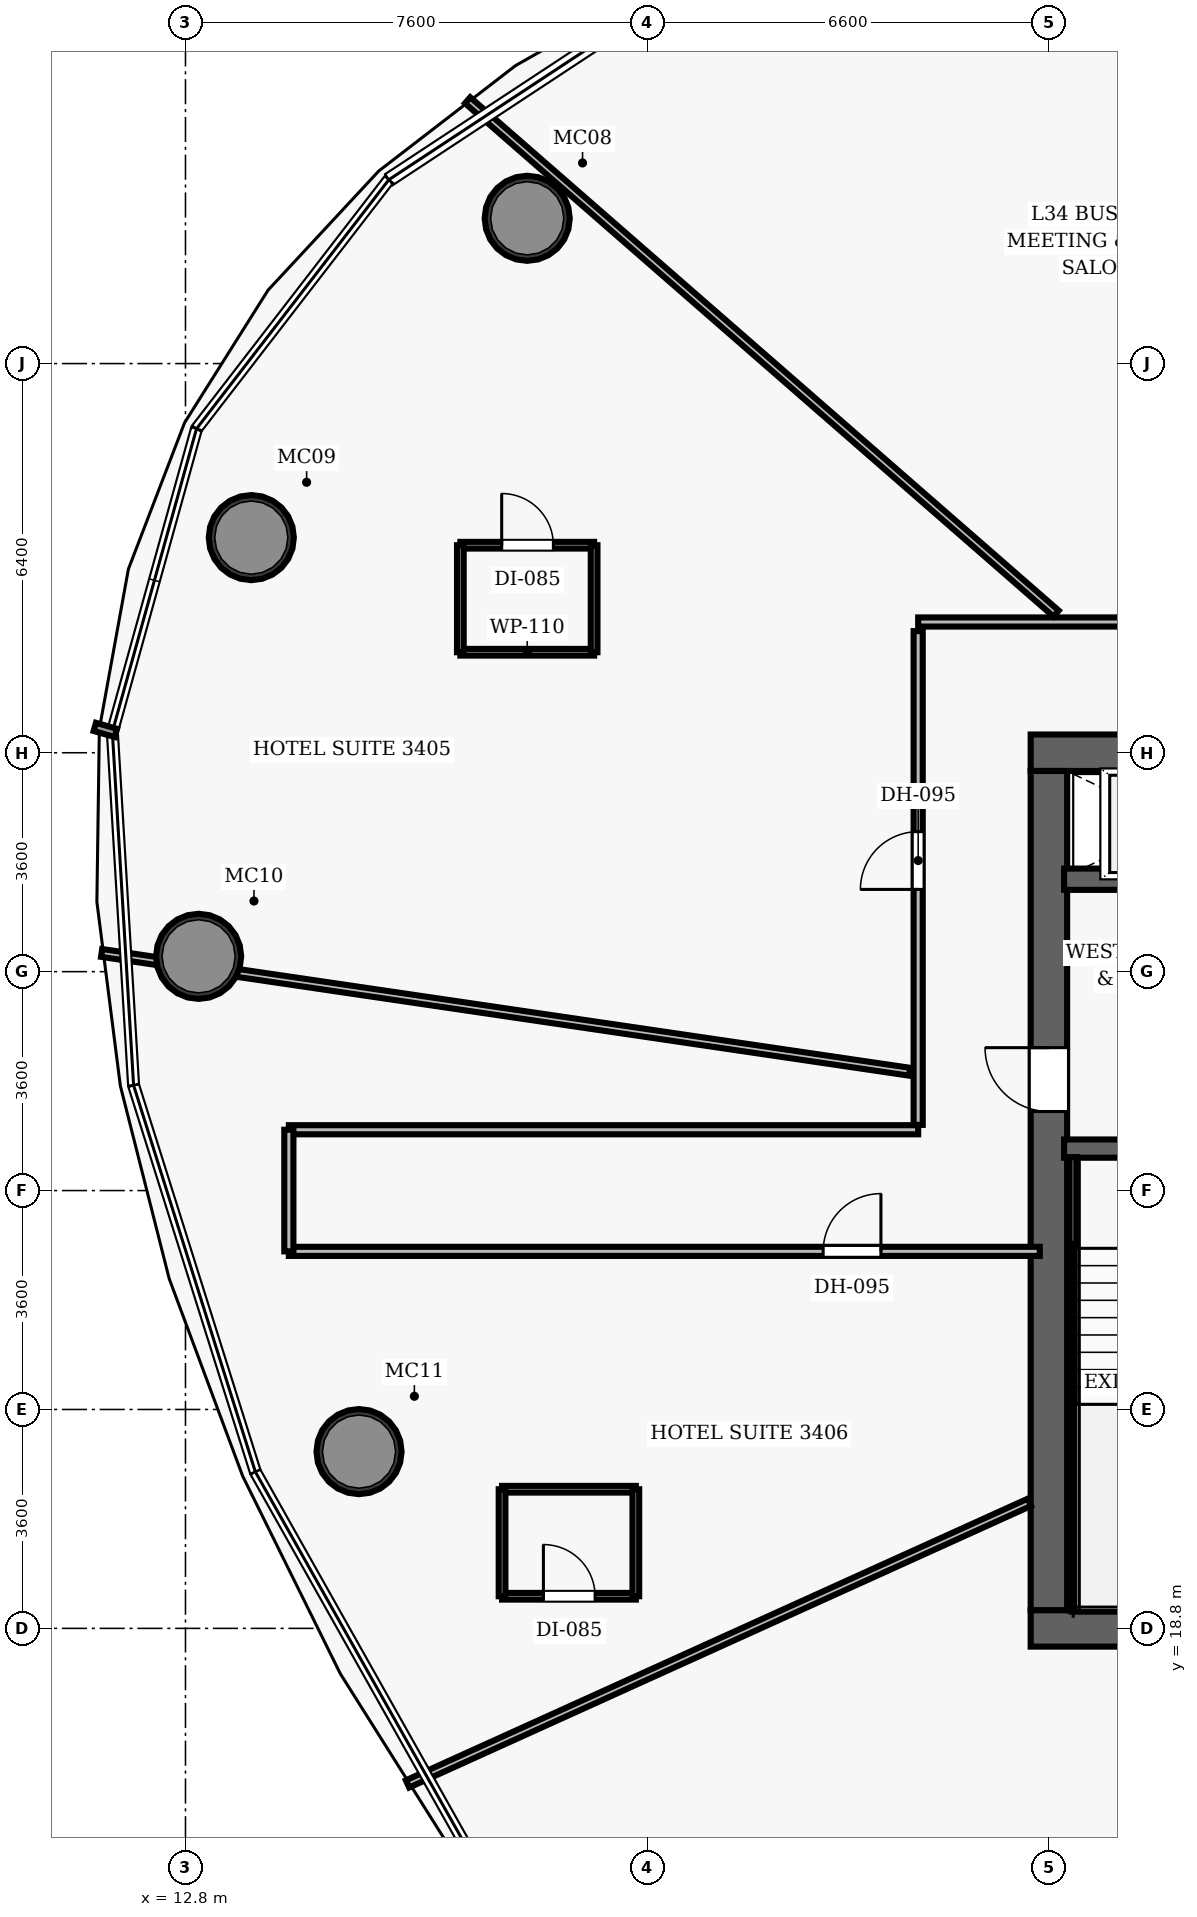
"""IFC4 building model, lengths in metres.
Left out: names, types, materials, properties, quantities, classifications, styles, units other than length and angle.
Written with IfcOpenShell. Run it as: python <this file> out.ifc"""

import sys

from ifc_helpers import new_model, si_unit, direction, frame, frame_2d, origin, origin_2d, place, context, subcontext, project, spatial, rectangle, hollow_circle, extrude, element, fill, save


model = new_model("IFC4")
c1 = context("Model", 3, precision=1e-05, world=origin(), true_north=direction((0.0, 1.0)))
c2 = subcontext(c1, "Body", "Model", "MODEL_VIEW")
j1 = project(units=[si_unit("LENGTHUNIT", "METRE"), si_unit("PLANEANGLEUNIT", "RADIAN")], contexts=[c1])
p1 = place(None, origin())
s1 = spatial("IfcSite", under=j1, at=p1, CompositionType="ELEMENT")
p2 = place(p1, origin())
s2 = spatial("IfcBuilding", under=s1, at=p2, CompositionType="ELEMENT")
p3 = place(p2, frame((0.0, 0.0, 137.8)))
s3 = spatial("IfcBuildingStorey", under=s2, at=p3, CompositionType="ELEMENT", Elevation=137.8)
p4 = place(p3, frame((26.7, 18.8, 0.0), z_axis=(0.0, 0.0, 1.0), x_axis=(1.0, 0.0, 0.0)))
e1 = element("IfcWall", 1, at=p4, inside=s3, PredefinedType="SHEAR", context=c2, shape_type="SweptSolid", body=[
    extrude(rectangle(XDim=22.6, YDim=0.6, at=frame_2d((11.3, 0.0))), origin(), (0.0, 0.0, 1.0), 3.5),
])
p5 = place(p4, frame((14.52, 0.0, 0.0)))
e2 = element("IfcOpeningElement", 2, at=p5, cuts=e1, PredefinedType="OPENING", context=c2, shape_type="SweptSolid", body=[
    extrude(rectangle(XDim=1.05, YDim=2.15, at=frame_2d((0.525, 1.075))), frame((0.0, 0.31, 0.0), z_axis=(0.0, -1.0, 0.0), x_axis=(1.0, 0.0, 0.0)), (0.0, 0.0, 1.0), 0.62),
])
p6 = place(p3, frame((26.7, 33.2, 0.0), z_axis=(0.0, 0.0, 1.0), x_axis=(1.0, 0.0, 0.0)))
e3 = element("IfcWall", 3, at=p6, inside=s3, PredefinedType="SHEAR", context=c2, shape_type="SweptSolid", body=[
    extrude(rectangle(XDim=22.6, YDim=0.6, at=frame_2d((11.3, 0.0))), origin(), (0.0, 0.0, 1.0), 3.5),
])
p7 = place(p6, frame((4.62, 0.0, 0.0)))
e4 = element("IfcOpeningElement", 4, at=p7, cuts=e3, PredefinedType="OPENING", context=c2, shape_type="SweptSolid", body=[
    extrude(rectangle(XDim=1.05, YDim=2.15, at=frame_2d((0.525, 1.075))), frame((0.0, 0.31, 0.0), z_axis=(0.0, -1.0, 0.0), x_axis=(1.0, 0.0, 0.0)), (0.0, 0.0, 1.0), 0.62),
])
p8 = place(p6, frame((14.52, 0.0, 0.0)))
e5 = element("IfcOpeningElement", 5, at=p8, cuts=e3, PredefinedType="OPENING", context=c2, shape_type="SweptSolid", body=[
    extrude(rectangle(XDim=1.05, YDim=2.15, at=frame_2d((0.525, 1.075))), frame((0.0, 0.31, 0.0), z_axis=(0.0, -1.0, 0.0), x_axis=(1.0, 0.0, 0.0)), (0.0, 0.0, 1.0), 0.62),
])
p9 = place(p3, frame((27.0, 19.1, 0.0), z_axis=(0.0, 0.0, 1.0), x_axis=(0.0, 1.0, 0.0)))
e6 = element("IfcWall", 6, at=p9, inside=s3, PredefinedType="SHEAR", context=c2, shape_type="SweptSolid", body=[
    extrude(rectangle(XDim=13.8, YDim=0.6, at=frame_2d((6.9, 0.0))), origin(), (0.0, 0.0, 1.0), 3.5),
])
p10 = place(p9, frame((8.2, 0.0, 0.0)))
e7 = element("IfcOpeningElement", 7, at=p10, cuts=e6, PredefinedType="OPENING", context=c2, shape_type="SweptSolid", body=[
    extrude(rectangle(XDim=1.05, YDim=2.15, at=frame_2d((0.525, 1.075))), frame((0.0, 0.31, 0.0), z_axis=(0.0, -1.0, 0.0), x_axis=(1.0, 0.0, 0.0)), (0.0, 0.0, 1.0), 0.62),
])
for number, where, z_axis, x_axis in (
    (8, (18.42, 41.989, 0.0), (0.0, 0.0, 1.0), (1.0, 0.0, 0.0)),
    (9, (13.882, 36.738, 0.0), (0.0, 0.0, 1.0), (1.0, 0.0, 0.0)),
    (10, (13.016, 29.852, 0.0), (0.0, 0.0, 1.0), (1.0, 0.0, 0.0)),
    (11, (15.654, 21.707, 0.0), (0.0, 0.0, 1.0), (1.0, 0.0, 0.0)),
):
    element("IfcColumn", number, at=place(p3, frame(where, z_axis=z_axis, x_axis=x_axis)), inside=s3, PredefinedType="COLUMN", context=c2, shape_type="SweptSolid", body=[
        extrude(hollow_circle(Radius=0.7, WallThickness=0.055, at=origin_2d()), origin(), (0.0, 0.0, 1.0), 3.5),
    ])
p11 = place(p3, frame((27.25, 26.69, 0.0), z_axis=(0.0, 0.0, 1.0), x_axis=(1.0, 0.0, 0.0)))
e12 = element("IfcWall", 12, at=p11, inside=s3, PredefinedType="SHEAR", context=c2, shape_type="SweptSolid", body=[
    extrude(rectangle(XDim=3.67, YDim=0.3, at=frame_2d((1.835, 0.0))), origin(), (0.0, 0.0, 1.0), 3.5),
])
p12 = place(p11, frame((1.05, 0.0, 0.0)))
e13 = element("IfcOpeningElement", 13, at=p12, cuts=e12, PredefinedType="OPENING", context=c2, shape_type="SweptSolid", body=[
    extrude(rectangle(XDim=1.1, YDim=2.15, at=frame_2d((0.55, 1.075))), frame((0.0, 0.16, 0.0), z_axis=(0.0, -1.0, 0.0), x_axis=(1.0, 0.0, 0.0)), (0.0, 0.0, 1.0), 0.32),
])
p13 = place(p3, frame((27.395, 19.1, 0.0), z_axis=(0.0, 0.0, 1.0), x_axis=(0.0, 1.0, 0.0)))
e14 = element("IfcWall", 14, at=p13, inside=s3, PredefinedType="SHEAR", context=c2, shape_type="SweptSolid", body=[
    extrude(rectangle(XDim=7.45, YDim=0.12, at=frame_2d((3.725, 0.0))), origin(), (0.0, 0.0, 1.0), 3.5),
])
p14 = place(p3, frame((27.395, 19.16, 0.0), z_axis=(0.0, 0.0, 1.0), x_axis=(1.0, 0.0, 0.0)))
e15 = element("IfcWall", 15, at=p14, inside=s3, PredefinedType="SHEAR", context=c2, shape_type="SweptSolid", body=[
    extrude(rectangle(XDim=3.095, YDim=0.12, at=frame_2d((1.547, 0.0))), origin(), (0.0, 0.0, 1.0), 3.5),
])
p15 = place(p3, frame((27.25, 31.12, 0.0), z_axis=(0.0, 0.0, 1.0), x_axis=(1.0, 0.0, 0.0)))
e16 = element("IfcWall", 16, at=p15, inside=s3, PredefinedType="SHEAR", context=c2, shape_type="SweptSolid", body=[
    extrude(rectangle(XDim=3.67, YDim=0.35, at=frame_2d((1.835, 0.0))), origin(), (0.0, 0.0, 1.0), 2.675),
])
p16 = place(p15, frame((1.25, 0.0, 0.0)))
e17 = element("IfcOpeningElement", 17, at=p16, cuts=e16, PredefinedType="OPENING", context=c2, shape_type="SweptSolid", body=[
    extrude(rectangle(XDim=1.1, YDim=2.15, at=frame_2d((0.55, 1.075))), frame((0.0, 0.185, 0.0), z_axis=(0.0, -1.0, 0.0), x_axis=(1.0, 0.0, 0.0)), (0.0, 0.0, 1.0), 0.37),
])
p17 = place(p3, frame((24.85, 35.35, 0.0), z_axis=(0.0, 0.0, 1.0), x_axis=(1.0, 0.0, 0.0)))
e18 = element("IfcWall", 18, at=p17, inside=s3, PredefinedType="PARTITIONING", context=c2, shape_type="SweptSolid", body=[
    extrude(rectangle(XDim=26.0, YDim=0.15, at=frame_2d((13.0, 0.0))), origin(), (0.0, 0.0, 1.0), 2.675),
])
p18 = place(p17, frame((17.4, 0.0, 0.0)))
e19 = element("IfcOpeningElement", 19, at=p18, cuts=e18, PredefinedType="OPENING", context=c2, shape_type="SweptSolid", body=[
    extrude(rectangle(XDim=0.95, YDim=2.15, at=frame_2d((0.475, 1.075))), frame((0.0, 0.085, 0.0), z_axis=(0.0, -1.0, 0.0), x_axis=(1.0, 0.0, 0.0)), (0.0, 0.0, 1.0), 0.17),
])
p19 = place(p17, frame((12.708, 0.0, 0.0)))
e20 = element("IfcOpeningElement", 20, at=p19, cuts=e18, PredefinedType="OPENING", context=c2, shape_type="SweptSolid", body=[
    extrude(rectangle(XDim=0.95, YDim=2.15, at=frame_2d((0.475, 1.075))), frame((0.0, 0.085, 0.0), z_axis=(0.0, -1.0, 0.0), x_axis=(1.0, 0.0, 0.0)), (0.0, 0.0, 1.0), 0.17),
])
p20 = place(p17, frame((7.158, 0.0, 0.0)))
e21 = element("IfcOpeningElement", 21, at=p20, cuts=e18, PredefinedType="OPENING", context=c2, shape_type="SweptSolid", body=[
    extrude(rectangle(XDim=0.95, YDim=2.15, at=frame_2d((0.475, 1.075))), frame((0.0, 0.085, 0.0), z_axis=(0.0, -1.0, 0.0), x_axis=(1.0, 0.0, 0.0)), (0.0, 0.0, 1.0), 0.17),
])
p21 = place(p3, frame((24.85, 27.08, 0.0), z_axis=(0.0, 0.0, 1.0), x_axis=(0.0, 1.0, 0.0)))
e22 = element("IfcWall", 22, at=p21, inside=s3, PredefinedType="PARTITIONING", context=c2, shape_type="SweptSolid", body=[
    extrude(rectangle(XDim=8.12, YDim=0.15, at=frame_2d((4.06, 0.0))), origin(), (0.0, 0.0, 1.0), 2.675),
])
p22 = place(p21, frame((3.872, 0.0, 0.0)))
e23 = element("IfcOpeningElement", 23, at=p22, cuts=e22, PredefinedType="OPENING", context=c2, shape_type="SweptSolid", body=[
    extrude(rectangle(XDim=0.95, YDim=2.15, at=frame_2d((0.475, 1.075))), frame((0.0, 0.085, 0.0), z_axis=(0.0, -1.0, 0.0), x_axis=(1.0, 0.0, 0.0)), (0.0, 0.0, 1.0), 0.17),
])
p23 = place(p3, frame((14.5, 27.0, 0.0), z_axis=(0.0, 0.0, 1.0), x_axis=(1.0, 0.0, 0.0)))
e24 = element("IfcWall", 24, at=p23, inside=s3, PredefinedType="PARTITIONING", context=c2, shape_type="SweptSolid", body=[
    extrude(rectangle(XDim=10.35, YDim=0.15, at=frame_2d((5.175, 0.0))), origin(), (0.0, 0.0, 1.0), 2.675),
])
p24 = place(p3, frame((14.5, 25.0, 0.0), z_axis=(0.0, 0.0, 1.0), x_axis=(1.0, 0.0, 0.0)))
e25 = element("IfcWall", 25, at=p24, inside=s3, PredefinedType="PARTITIONING", context=c2, shape_type="SweptSolid", body=[
    extrude(rectangle(XDim=12.35, YDim=0.15, at=frame_2d((6.175, 0.0))), origin(), (0.0, 0.0, 1.0), 2.675),
])
p25 = place(p24, frame((8.788, 0.0, 0.0)))
e26 = element("IfcOpeningElement", 26, at=p25, cuts=e25, PredefinedType="OPENING", context=c2, shape_type="SweptSolid", body=[
    extrude(rectangle(XDim=0.95, YDim=2.15, at=frame_2d((0.475, 1.075))), frame((0.0, 0.085, 0.0), z_axis=(0.0, -1.0, 0.0), x_axis=(1.0, 0.0, 0.0)), (0.0, 0.0, 1.0), 0.17),
])
p26 = place(p3, frame((14.5, 25.0, 0.0), z_axis=(0.0, 0.0, 1.0), x_axis=(0.0, 1.0, 0.0)))
e27 = element("IfcWall", 27, at=p26, inside=s3, PredefinedType="PARTITIONING", context=c2, shape_type="SweptSolid", body=[
    extrude(rectangle(XDim=2.0, YDim=0.15, at=frame_2d((1.0, 0.0))), origin(), (0.0, 0.0, 1.0), 2.675),
])
p27 = place(p3, frame((27.118, 35.49, 0.0), z_axis=(0.0, 0.0, 1.0), x_axis=(-0.753667438704, 0.657255956106, 0.0)))
e28 = element("IfcWall", 28, at=p27, inside=s3, PredefinedType="PARTITIONING", context=c2, shape_type="SweptSolid", body=[
    extrude(rectangle(XDim=12.841, YDim=0.13, at=frame_2d((6.42, 0.0))), origin(), (0.0, 0.0, 1.0), 2.675),
])
p28 = place(p3, frame((24.71, 27.954, 0.0), z_axis=(0.0, 0.0, 1.0), x_axis=(-0.989364367295, 0.145458408926, 0.0)))
e29 = element("IfcWall", 29, at=p28, inside=s3, PredefinedType="PARTITIONING", context=c2, shape_type="SweptSolid", body=[
    extrude(rectangle(XDim=13.432, YDim=0.13, at=frame_2d((6.716, 0.0))), origin(), (0.0, 0.0, 1.0), 2.675),
])
p29 = place(p3, frame((26.68, 20.874, 0.0), z_axis=(0.0, 0.0, 1.0), x_axis=(-0.910944929942, -0.4125279804, 0.0)))
e30 = element("IfcWall", 30, at=p29, inside=s3, PredefinedType="PARTITIONING", context=c2, shape_type="SweptSolid", body=[
    extrude(rectangle(XDim=11.228, YDim=0.13, at=frame_2d((5.614, 0.0))), origin(), (0.0, 0.0, 1.0), 2.675),
])
p30 = place(p3, frame((33.133, 18.48, 0.0), z_axis=(0.0, 0.0, 1.0), x_axis=(-0.543304894445, -0.839535461831, 0.0)))
e31 = element("IfcWall", 31, at=p30, inside=s3, PredefinedType="PARTITIONING", context=c2, shape_type="SweptSolid", body=[
    extrude(rectangle(XDim=13.971, YDim=0.13, at=frame_2d((6.986, 0.0))), origin(), (0.0, 0.0, 1.0), 2.675),
])
p31 = place(p3, frame((17.321, 34.853, 0.0), z_axis=(0.0, 0.0, 1.0), x_axis=(1.0, 0.0, 0.0)))
e32 = element("IfcWall", 32, at=p31, inside=s3, PredefinedType="PARTITIONING", context=c2, shape_type="SweptSolid", body=[
    extrude(rectangle(XDim=2.2, YDim=0.11, at=frame_2d((1.1, 0.0))), origin(), (0.0, 0.0, 1.0), 2.675),
])
p32 = place(p3, frame((17.321, 36.613, 0.0), z_axis=(0.0, 0.0, 1.0), x_axis=(1.0, 0.0, 0.0)))
e33 = element("IfcWall", 33, at=p32, inside=s3, PredefinedType="PARTITIONING", context=c2, shape_type="SweptSolid", body=[
    extrude(rectangle(XDim=2.2, YDim=0.11, at=frame_2d((1.1, 0.0))), origin(), (0.0, 0.0, 1.0), 2.675),
])
p33 = place(p32, frame((0.68, 0.0, 0.0)))
e34 = element("IfcOpeningElement", 34, at=p33, cuts=e33, PredefinedType="OPENING", context=c2, shape_type="SweptSolid", body=[
    extrude(rectangle(XDim=0.85, YDim=2.1, at=frame_2d((0.425, 1.05))), frame((0.0, 0.065, 0.0), z_axis=(0.0, -1.0, 0.0), x_axis=(1.0, 0.0, 0.0)), (0.0, 0.0, 1.0), 0.13),
])
for number, where, z_axis, x_axis in (
    (35, (17.321, 34.853, 0.0), (0.0, 0.0, 1.0), (0.0, 1.0, 0.0)),
    (36, (19.521, 34.853, 0.0), (0.0, 0.0, 1.0), (0.0, 1.0, 0.0)),
):
    element("IfcWall", number, at=place(p3, frame(where, z_axis=z_axis, x_axis=x_axis)), inside=s3, PredefinedType="PARTITIONING", context=c2, shape_type="SweptSolid", body=[
        extrude(rectangle(XDim=1.76, YDim=0.11, at=frame_2d((0.88, 0.0))), origin(), (0.0, 0.0, 1.0), 2.675),
    ])
p34 = place(p3, frame((18.007, 19.328, 0.0), z_axis=(0.0, 0.0, 1.0), x_axis=(1.0, 0.0, 0.0)))
e37 = element("IfcWall", 37, at=p34, inside=s3, PredefinedType="PARTITIONING", context=c2, shape_type="SweptSolid", body=[
    extrude(rectangle(XDim=2.2, YDim=0.11, at=frame_2d((1.1, 0.0))), origin(), (0.0, 0.0, 1.0), 2.675),
])
p35 = place(p34, frame((0.68, 0.0, 0.0)))
e38 = element("IfcOpeningElement", 38, at=p35, cuts=e37, PredefinedType="OPENING", context=c2, shape_type="SweptSolid", body=[
    extrude(rectangle(XDim=0.85, YDim=2.1, at=frame_2d((0.425, 1.05))), frame((0.0, 0.065, 0.0), z_axis=(0.0, -1.0, 0.0), x_axis=(1.0, 0.0, 0.0)), (0.0, 0.0, 1.0), 0.13),
])
p36 = place(p3, frame((18.007, 21.088, 0.0), z_axis=(0.0, 0.0, 1.0), x_axis=(1.0, 0.0, 0.0)))
e39 = element("IfcWall", 39, at=p36, inside=s3, PredefinedType="PARTITIONING", context=c2, shape_type="SweptSolid", body=[
    extrude(rectangle(XDim=2.2, YDim=0.11, at=frame_2d((1.1, 0.0))), origin(), (0.0, 0.0, 1.0), 2.675),
])
for number, where, z_axis, x_axis in (
    (40, (18.007, 19.328, 0.0), (0.0, 0.0, 1.0), (0.0, 1.0, 0.0)),
    (41, (20.207, 19.328, 0.0), (0.0, 0.0, 1.0), (0.0, 1.0, 0.0)),
):
    element("IfcWall", number, at=place(p3, frame(where, z_axis=z_axis, x_axis=x_axis)), inside=s3, PredefinedType="PARTITIONING", context=c2, shape_type="SweptSolid", body=[
        extrude(rectangle(XDim=1.76, YDim=0.11, at=frame_2d((0.88, 0.0))), origin(), (0.0, 0.0, 1.0), 2.675),
    ])
p37 = place(p10, origin())
e42 = element("IfcDoor", 42, at=p37, inside=s3, OperationType="SINGLE_SWING_RIGHT", PredefinedType="DOOR", context=c2, shape_type="SweptSolid", body=[
    extrude(rectangle(XDim=1.05, YDim=2.15, at=frame_2d((0.525, 1.075))), frame((0.0, 0.025, 0.0), z_axis=(0.0, -1.0, 0.0), x_axis=(1.0, 0.0, 0.0)), (0.0, 0.0, 1.0), 0.05),
])
fill(e7, e42)
p38 = place(p22, origin())
e43 = element("IfcDoor", 43, at=p38, inside=s3, OperationType="SINGLE_SWING_LEFT", PredefinedType="DOOR", context=c2, shape_type="SweptSolid", body=[
    extrude(rectangle(XDim=0.95, YDim=2.15, at=frame_2d((0.475, 1.075))), frame((0.0, 0.025, 0.0), z_axis=(0.0, -1.0, 0.0), x_axis=(1.0, 0.0, 0.0)), (0.0, 0.0, 1.0), 0.05),
])
fill(e23, e43)
p39 = place(p33, origin())
e44 = element("IfcDoor", 44, at=p39, inside=s3, OperationType="SINGLE_SWING_LEFT", PredefinedType="DOOR", context=c2, shape_type="SweptSolid", body=[
    extrude(rectangle(XDim=0.85, YDim=2.1, at=frame_2d((0.425, 1.05))), frame((0.0, 0.025, 0.0), z_axis=(0.0, -1.0, 0.0), x_axis=(1.0, 0.0, 0.0)), (0.0, 0.0, 1.0), 0.05),
])
fill(e34, e44)
p40 = place(p25, origin())
e45 = element("IfcDoor", 45, at=p40, inside=s3, OperationType="SINGLE_SWING_RIGHT", PredefinedType="DOOR", context=c2, shape_type="SweptSolid", body=[
    extrude(rectangle(XDim=0.95, YDim=2.15, at=frame_2d((0.475, 1.075))), frame((0.0, 0.025, 0.0), z_axis=(0.0, -1.0, 0.0), x_axis=(1.0, 0.0, 0.0)), (0.0, 0.0, 1.0), 0.05),
])
fill(e26, e45)
p41 = place(p35, origin())
e46 = element("IfcDoor", 46, at=p41, inside=s3, OperationType="SINGLE_SWING_LEFT", PredefinedType="DOOR", context=c2, shape_type="SweptSolid", body=[
    extrude(rectangle(XDim=0.85, YDim=2.1, at=frame_2d((0.425, 1.05))), frame((0.0, 0.025, 0.0), z_axis=(0.0, -1.0, 0.0), x_axis=(1.0, 0.0, 0.0)), (0.0, 0.0, 1.0), 0.05),
])
fill(e38, e46)
save(model, sys.argv[1])
